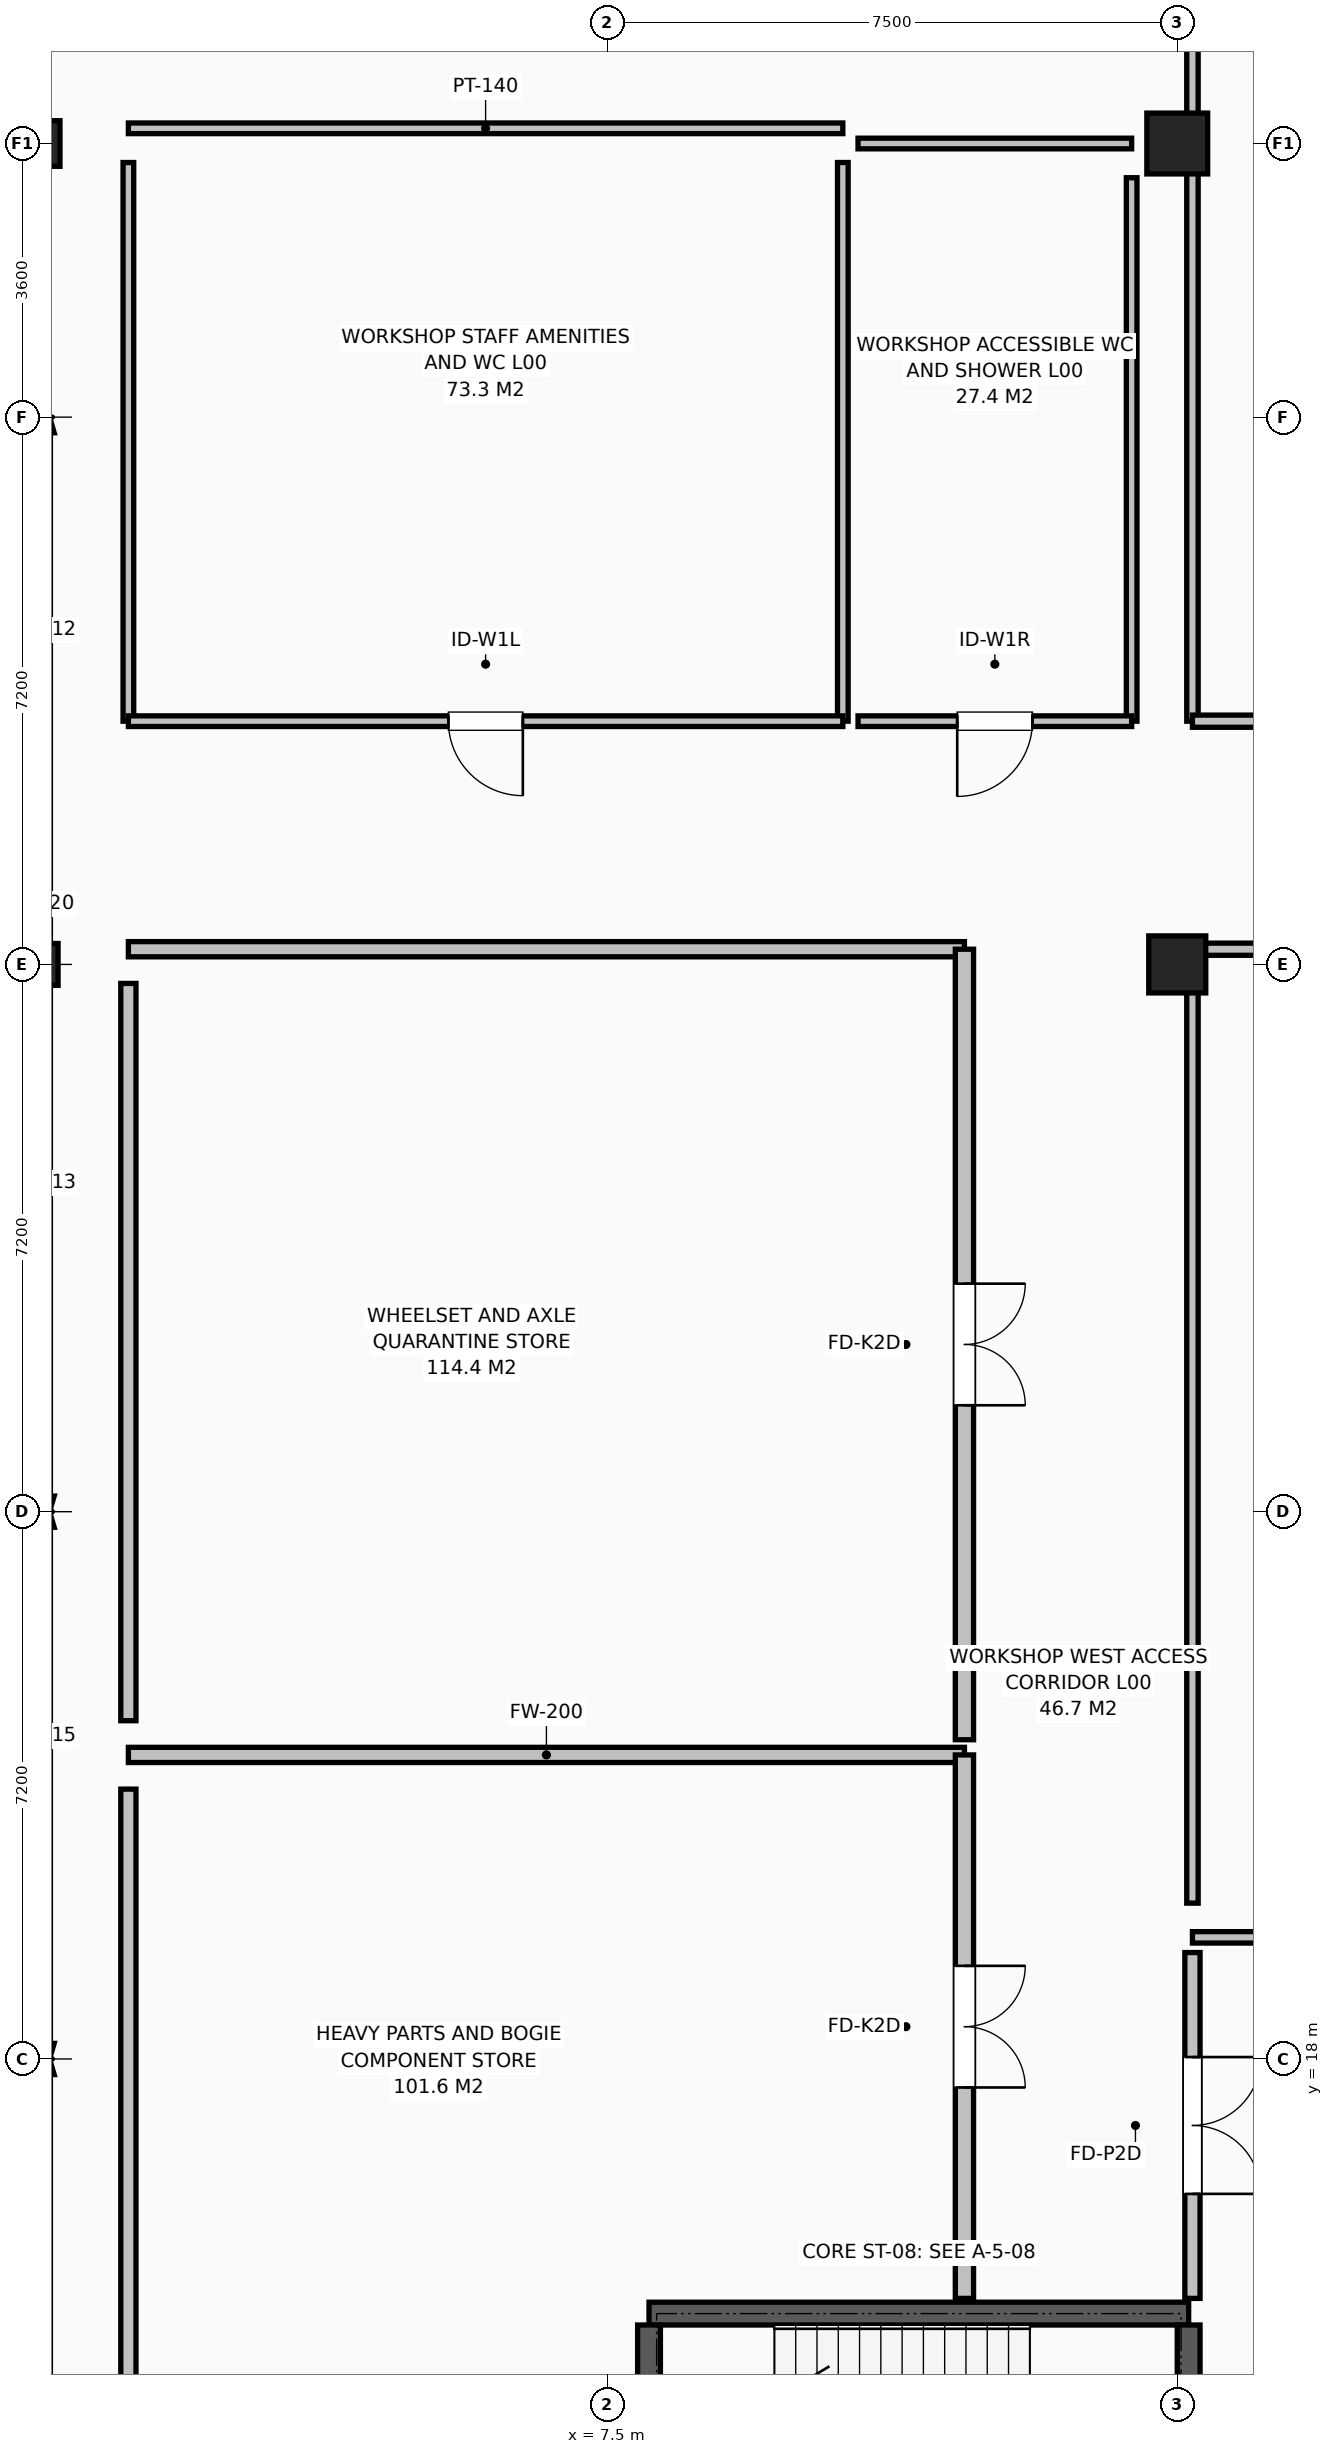
"""IFC4 building model, lengths in metres.
Left out: names, types, materials, properties, quantities, classifications, styles, units other than length and angle.
Written with IfcOpenShell. Run it as: python <this file> out.ifc"""

import sys

from ifc_helpers import new_model, si_unit, direction, frame, frame_2d, origin, origin_2d, place, context, subcontext, project, spatial, rectangle, extrude, element, fill, save


model = new_model("IFC4")
c1 = context("Model", 3, precision=1e-05, world=origin(), true_north=direction((0.0, 1.0)))
c2 = subcontext(c1, "Body", "Model", "MODEL_VIEW")
j1 = project(units=[si_unit("LENGTHUNIT", "METRE"), si_unit("PLANEANGLEUNIT", "RADIAN")], contexts=[c1])
p1 = place(None, origin())
s1 = spatial("IfcSite", under=j1, at=p1, CompositionType="ELEMENT")
p2 = place(p1, origin())
s2 = spatial("IfcBuilding", under=s1, at=p2, CompositionType="ELEMENT")
p3 = place(p2, origin())
s3 = spatial("IfcBuildingStorey", under=s2, at=p3, CompositionType="ELEMENT", Elevation=0.0)
p4 = place(p3, frame((0.0, 32.4, 0.0), z_axis=(0.0, 0.0, 1.0), x_axis=(1.0, 0.0, 0.0)))
e1 = element("IfcColumn", 1, at=p4, inside=s3, PredefinedType="COLUMN", context=c2, shape_type="SweptSolid", body=[
    extrude(rectangle(XDim=0.55, YDim=0.55, at=origin_2d()), origin(), (0.0, 0.0, 1.0), 4.8),
])
p5 = place(p3, frame((0.0, 43.2, 0.0), z_axis=(0.0, 0.0, 1.0), x_axis=(1.0, 0.0, 0.0)))
e2 = element("IfcColumn", 2, at=p5, inside=s3, PredefinedType="COLUMN", context=c2, shape_type="SweptSolid", body=[
    extrude(rectangle(XDim=0.6, YDim=0.6, at=origin_2d()), origin(), (0.0, 0.0, 1.0), 4.8),
])
p6 = place(p3, frame((15.0, 32.4, 0.0), z_axis=(0.0, 0.0, 1.0), x_axis=(1.0, 0.0, 0.0)))
e3 = element("IfcColumn", 3, at=p6, inside=s3, PredefinedType="COLUMN", context=c2, shape_type="SweptSolid", body=[
    extrude(rectangle(XDim=0.75, YDim=0.75, at=origin_2d()), origin(), (0.0, 0.0, 1.0), 4.8),
])
p7 = place(p3, frame((15.0, 43.2, 0.0), z_axis=(0.0, 0.0, 1.0), x_axis=(1.0, 0.0, 0.0)))
e4 = element("IfcColumn", 4, at=p7, inside=s3, PredefinedType="COLUMN", context=c2, shape_type="SweptSolid", body=[
    extrude(rectangle(XDim=0.8, YDim=0.8, at=origin_2d()), origin(), (0.0, 0.0, 1.0), 4.8),
])
p8 = place(p3, frame((15.15, 14.65, 0.0), z_axis=(0.0, 0.0, 1.0), x_axis=(-1.0, 0.0, 0.0)))
e5 = element("IfcWall", 5, at=p8, inside=s3, PredefinedType="SHEAR", context=c2, shape_type="SweptSolid", body=[
    extrude(rectangle(XDim=7.1, YDim=0.3, at=frame_2d((3.55, 0.0))), origin(), (0.0, 0.0, 1.0), 4.5),
])
p9 = place(p3, frame((15.15, 11.6, 0.0), z_axis=(0.0, 0.0, 1.0), x_axis=(0.0, 1.0, 0.0)))
e6 = element("IfcWall", 6, at=p9, inside=s3, PredefinedType="SHEAR", context=c2, shape_type="SweptSolid", body=[
    extrude(rectangle(XDim=2.9, YDim=0.3, at=frame_2d((1.45, 0.0))), origin(), (0.0, 0.0, 1.0), 4.5),
])
p10 = place(p3, frame((8.05, 14.5, 0.0), z_axis=(0.0, 0.0, 1.0), x_axis=(0.0, -1.0, 0.0)))
e7 = element("IfcWall", 7, at=p10, inside=s3, PredefinedType="SHEAR", context=c2, shape_type="SweptSolid", body=[
    extrude(rectangle(XDim=2.9, YDim=0.3, at=frame_2d((1.45, 0.0))), origin(), (0.0, 0.0, 1.0), 4.5),
])
p11 = place(p10, frame((0.75, 0.0, 0.0)))
e8 = element("IfcOpeningElement", 8, at=p11, cuts=e7, PredefinedType="OPENING", context=c2, shape_type="SweptSolid", body=[
    extrude(rectangle(XDim=1.07, YDim=2.15, at=frame_2d((0.535, 1.075))), frame((0.0, 0.16, 0.0), z_axis=(0.0, -1.0, 0.0), x_axis=(1.0, 0.0, 0.0)), (0.0, 0.0, 1.0), 0.32),
])
p12 = place(p3, frame((55.8, 19.6, 0.0), z_axis=(0.0, 0.0, 1.0), x_axis=(-1.0, 0.0, 0.0)))
e9 = element("IfcWall", 9, at=p12, inside=s3, PredefinedType="PARTITIONING", context=c2, shape_type="SweptSolid", body=[
    extrude(rectangle(XDim=40.6, YDim=0.15, at=frame_2d((20.3, 0.0))), origin(), (0.0, 0.0, 1.0), 3.682),
])
p13 = place(p3, frame((15.2, 32.6, 0.0), z_axis=(0.0, 0.0, 1.0), x_axis=(0.0, -1.0, 0.0)))
e10 = element("IfcWall", 10, at=p13, inside=s3, PredefinedType="PARTITIONING", context=c2, shape_type="SweptSolid", body=[
    extrude(rectangle(XDim=12.55, YDim=0.15, at=frame_2d((6.275, 0.0))), origin(), (0.0, 0.0, 1.0), 4.1),
])
p14 = place(p3, frame((15.2, 32.6, 0.0), z_axis=(0.0, 0.0, 1.0), x_axis=(1.0, 0.0, 0.0)))
e11 = element("IfcWall", 11, at=p14, inside=s3, PredefinedType="PARTITIONING", context=c2, shape_type="SweptSolid", body=[
    extrude(rectangle(XDim=40.6, YDim=0.16, at=frame_2d((20.3, 0.0))), origin(), (0.0, 0.0, 1.0), 3.87),
])
p15 = place(p14, frame((19.3, 0.0, 0.0)))
e12 = element("IfcOpeningElement", 12, at=p15, cuts=e11, PredefinedType="OPENING", context=c2, shape_type="SweptSolid", body=[
    extrude(rectangle(XDim=2.0, YDim=2.3, at=frame_2d((1.0, 1.15))), frame((0.0, 0.09, 0.0), z_axis=(0.0, -1.0, 0.0), x_axis=(1.0, 0.0, 0.0)), (0.0, 0.0, 1.0), 0.18),
])
p16 = place(p14, frame((35.4, 0.0, 0.0)))
e13 = element("IfcOpeningElement", 13, at=p16, cuts=e11, PredefinedType="OPENING", context=c2, shape_type="SweptSolid", body=[
    extrude(rectangle(XDim=2.0, YDim=2.3, at=frame_2d((1.0, 1.15))), frame((0.0, 0.09, 0.0), z_axis=(0.0, -1.0, 0.0), x_axis=(1.0, 0.0, 0.0)), (0.0, 0.0, 1.0), 0.18),
])
p17 = place(p3, frame((15.2, 52.75, 0.0), z_axis=(0.0, 0.0, 1.0), x_axis=(0.0, -1.0, 0.0)))
e14 = element("IfcWall", 14, at=p17, inside=s3, PredefinedType="PARTITIONING", context=c2, shape_type="SweptSolid", body=[
    extrude(rectangle(XDim=17.15, YDim=0.15, at=frame_2d((8.575, 0.0))), origin(), (0.0, 0.0, 1.0), 4.025),
])
p18 = place(p3, frame((47.8, 35.6, 0.0), z_axis=(0.0, 0.0, 1.0), x_axis=(-1.0, 0.0, 0.0)))
e15 = element("IfcWall", 15, at=p18, inside=s3, PredefinedType="PARTITIONING", context=c2, shape_type="SweptSolid", body=[
    extrude(rectangle(XDim=32.6, YDim=0.16, at=frame_2d((16.3, 0.0))), origin(), (0.0, 0.0, 1.0), 4.025),
])
p19 = place(p18, frame((15.3, 0.0, 0.0)))
e16 = element("IfcOpeningElement", 16, at=p19, cuts=e15, PredefinedType="OPENING", context=c2, shape_type="SweptSolid", body=[
    extrude(rectangle(XDim=2.0, YDim=2.3, at=frame_2d((1.0, 1.15))), frame((0.0, 0.09, 0.0), z_axis=(0.0, -1.0, 0.0), x_axis=(1.0, 0.0, 0.0)), (0.0, 0.0, 1.0), 0.18),
])
p20 = place(p18, frame((27.4, 0.0, 0.0)))
e17 = element("IfcOpeningElement", 17, at=p20, cuts=e15, PredefinedType="OPENING", context=c2, shape_type="SweptSolid", body=[
    extrude(rectangle(XDim=2.0, YDim=2.3, at=frame_2d((1.0, 1.15))), frame((0.0, 0.09, 0.0), z_axis=(0.0, -1.0, 0.0), x_axis=(1.0, 0.0, 0.0)), (0.0, 0.0, 1.0), 0.18),
])
p21 = place(p3, frame((1.2, 22.0, 0.0), z_axis=(0.0, 0.0, 1.0), x_axis=(1.0, 0.0, 0.0)))
e18 = element("IfcWall", 18, at=p21, inside=s3, PredefinedType="SOLIDWALL", context=c2, shape_type="SweptSolid", body=[
    extrude(rectangle(XDim=11.0, YDim=0.2, at=frame_2d((5.5, 0.0))), origin(), (0.0, 0.0, 1.0), 4.1),
])
p22 = place(p3, frame((1.2, 21.55, 0.0), z_axis=(0.0, 0.0, 1.0), x_axis=(0.0, -1.0, 0.0)))
e19 = element("IfcWall", 19, at=p22, inside=s3, PredefinedType="SOLIDWALL", context=c2, shape_type="SweptSolid", body=[
    extrude(rectangle(XDim=9.7, YDim=0.2, at=frame_2d((4.85, 0.0))), origin(), (0.0, 0.0, 1.0), 4.1),
])
p23 = place(p3, frame((12.2, 14.85, 0.0), z_axis=(0.0, 0.0, 1.0), x_axis=(0.0, 1.0, 0.0)))
e20 = element("IfcWall", 20, at=p23, inside=s3, PredefinedType="SOLIDWALL", context=c2, shape_type="SweptSolid", body=[
    extrude(rectangle(XDim=7.15, YDim=0.24, at=frame_2d((3.575, 0.0))), origin(), (0.0, 0.0, 1.0), 4.1),
])
p24 = place(p23, frame((2.775, 0.0, 0.0)))
e21 = element("IfcOpeningElement", 21, at=p24, cuts=e20, PredefinedType="OPENING", context=c2, shape_type="SweptSolid", body=[
    extrude(rectangle(XDim=1.6, YDim=2.15, at=frame_2d((0.8, 1.075))), frame((0.0, 0.13, 0.0), z_axis=(0.0, -1.0, 0.0), x_axis=(1.0, 0.0, 0.0)), (0.0, 0.0, 1.0), 0.26),
])
p25 = place(p3, frame((1.2, 32.6, 0.0), z_axis=(0.0, 0.0, 1.0), x_axis=(1.0, 0.0, 0.0)))
e22 = element("IfcWall", 22, at=p25, inside=s3, PredefinedType="SOLIDWALL", context=c2, shape_type="SweptSolid", body=[
    extrude(rectangle(XDim=11.0, YDim=0.2, at=frame_2d((5.5, 0.0))), origin(), (0.0, 0.0, 1.0), 3.87),
])
p26 = place(p3, frame((1.2, 32.15, 0.0), z_axis=(0.0, 0.0, 1.0), x_axis=(0.0, -1.0, 0.0)))
e23 = element("IfcWall", 23, at=p26, inside=s3, PredefinedType="SOLIDWALL", context=c2, shape_type="SweptSolid", body=[
    extrude(rectangle(XDim=9.7, YDim=0.2, at=frame_2d((4.85, 0.0))), origin(), (0.0, 0.0, 1.0), 4.1),
])
p27 = place(p3, frame((12.2, 22.2, 0.0), z_axis=(0.0, 0.0, 1.0), x_axis=(0.0, 1.0, 0.0)))
e24 = element("IfcWall", 24, at=p27, inside=s3, PredefinedType="SOLIDWALL", context=c2, shape_type="SweptSolid", body=[
    extrude(rectangle(XDim=10.4, YDim=0.24, at=frame_2d((5.2, 0.0))), origin(), (0.0, 0.0, 1.0), 3.87),
])
p28 = place(p27, frame((4.4, 0.0, 0.0)))
e25 = element("IfcOpeningElement", 25, at=p28, cuts=e24, PredefinedType="OPENING", context=c2, shape_type="SweptSolid", body=[
    extrude(rectangle(XDim=1.6, YDim=2.15, at=frame_2d((0.8, 1.075))), frame((0.0, 0.13, 0.0), z_axis=(0.0, -1.0, 0.0), x_axis=(1.0, 0.0, 0.0)), (0.0, 0.0, 1.0), 0.26),
])
p29 = place(p3, frame((15.2, 19.4, 0.0), z_axis=(0.0, 0.0, 1.0), x_axis=(0.0, -1.0, 0.0)))
e26 = element("IfcWall", 26, at=p29, inside=s3, PredefinedType="SOLIDWALL", context=c2, shape_type="SweptSolid", body=[
    extrude(rectangle(XDim=4.55, YDim=0.2, at=frame_2d((2.275, 0.0))), origin(), (0.0, 0.0, 1.0), 4.1),
])
p30 = place(p29, frame((1.375, 0.0, 0.0)))
e27 = element("IfcOpeningElement", 27, at=p30, cuts=e26, PredefinedType="OPENING", context=c2, shape_type="SweptSolid", body=[
    extrude(rectangle(XDim=1.8, YDim=2.2, at=frame_2d((0.9, 1.1))), frame((0.0, 0.11, 0.0), z_axis=(0.0, -1.0, 0.0), x_axis=(1.0, 0.0, 0.0)), (0.0, 0.0, 1.0), 0.22),
])
p31 = place(p3, frame((1.2, 43.4, 0.0), z_axis=(0.0, 0.0, 1.0), x_axis=(1.0, 0.0, 0.0)))
e28 = element("IfcWall", 28, at=p31, inside=s3, PredefinedType="PARTITIONING", context=c2, shape_type="SweptSolid", body=[
    extrude(rectangle(XDim=9.4, YDim=0.14, at=frame_2d((4.7, 0.0))), origin(), (0.0, 0.0, 1.0), 3.8),
])
for number, where, z_axis, x_axis in (
    (29, (10.6, 35.6, 0.0), (0.0, 0.0, 1.0), (0.0, 1.0, 0.0)),
    (30, (1.2, 42.95, 0.0), (0.0, 0.0, 1.0), (0.0, -1.0, 0.0)),
):
    element("IfcWall", number, at=place(p3, frame(where, z_axis=z_axis, x_axis=x_axis)), inside=s3, PredefinedType="PARTITIONING", context=c2, shape_type="SweptSolid", body=[
        extrude(rectangle(XDim=7.35, YDim=0.14, at=frame_2d((3.675, 0.0))), origin(), (0.0, 0.0, 1.0), 3.8),
    ])
p32 = place(p3, frame((10.6, 35.6, 0.0), z_axis=(0.0, 0.0, 1.0), x_axis=(-1.0, 0.0, 0.0)))
e31 = element("IfcWall", 31, at=p32, inside=s3, PredefinedType="PARTITIONING", context=c2, shape_type="SweptSolid", body=[
    extrude(rectangle(XDim=9.4, YDim=0.14, at=frame_2d((4.7, 0.0))), origin(), (0.0, 0.0, 1.0), 3.8),
])
p33 = place(p32, frame((4.21, 0.0, 0.0)))
e32 = element("IfcOpeningElement", 32, at=p33, cuts=e31, PredefinedType="OPENING", context=c2, shape_type="SweptSolid", body=[
    extrude(rectangle(XDim=0.98, YDim=2.15, at=frame_2d((0.49, 1.075))), frame((0.0, 0.08, 0.0), z_axis=(0.0, -1.0, 0.0), x_axis=(1.0, 0.0, 0.0)), (0.0, 0.0, 1.0), 0.16),
])
p34 = place(p3, frame((10.8, 43.2, 0.0), z_axis=(0.0, 0.0, 1.0), x_axis=(1.0, 0.0, 0.0)))
e33 = element("IfcWall", 33, at=p34, inside=s3, PredefinedType="PARTITIONING", context=c2, shape_type="SweptSolid", body=[
    extrude(rectangle(XDim=3.6, YDim=0.14, at=frame_2d((1.8, 0.0))), origin(), (0.0, 0.0, 1.0), 3.8),
])
p35 = place(p3, frame((14.4, 35.6, 0.0), z_axis=(0.0, 0.0, 1.0), x_axis=(0.0, 1.0, 0.0)))
e34 = element("IfcWall", 34, at=p35, inside=s3, PredefinedType="PARTITIONING", context=c2, shape_type="SweptSolid", body=[
    extrude(rectangle(XDim=7.15, YDim=0.14, at=frame_2d((3.575, 0.0))), origin(), (0.0, 0.0, 1.0), 3.8),
])
p36 = place(p3, frame((14.4, 35.6, 0.0), z_axis=(0.0, 0.0, 1.0), x_axis=(-1.0, 0.0, 0.0)))
e35 = element("IfcWall", 35, at=p36, inside=s3, PredefinedType="PARTITIONING", context=c2, shape_type="SweptSolid", body=[
    extrude(rectangle(XDim=3.6, YDim=0.14, at=frame_2d((1.8, 0.0))), origin(), (0.0, 0.0, 1.0), 3.8),
])
p37 = place(p36, frame((1.305, 0.0, 0.0)))
e36 = element("IfcOpeningElement", 36, at=p37, cuts=e35, PredefinedType="OPENING", context=c2, shape_type="SweptSolid", body=[
    extrude(rectangle(XDim=0.99, YDim=2.15, at=frame_2d((0.495, 1.075))), frame((0.0, 0.08, 0.0), z_axis=(0.0, -1.0, 0.0), x_axis=(1.0, 0.0, 0.0)), (0.0, 0.0, 1.0), 0.16),
])
p38 = place(p24, origin())
e37 = element("IfcDoor", 37, at=p38, inside=s3, OperationType="DOUBLE_SWING_RIGHT", PredefinedType="DOOR", context=c2, shape_type="SweptSolid", body=[
    extrude(rectangle(XDim=1.6, YDim=2.15, at=frame_2d((0.8, 1.075))), frame((0.0, 0.025, 0.0), z_axis=(0.0, -1.0, 0.0), x_axis=(1.0, 0.0, 0.0)), (0.0, 0.0, 1.0), 0.05),
])
fill(e21, e37)
p39 = place(p28, origin())
e38 = element("IfcDoor", 38, at=p39, inside=s3, OperationType="DOUBLE_SWING_RIGHT", PredefinedType="DOOR", context=c2, shape_type="SweptSolid", body=[
    extrude(rectangle(XDim=1.6, YDim=2.15, at=frame_2d((0.8, 1.075))), frame((0.0, 0.025, 0.0), z_axis=(0.0, -1.0, 0.0), x_axis=(1.0, 0.0, 0.0)), (0.0, 0.0, 1.0), 0.05),
])
fill(e25, e38)
p40 = place(p30, origin())
e39 = element("IfcDoor", 39, at=p40, inside=s3, OperationType="DOUBLE_SWING_LEFT", PredefinedType="DOOR", context=c2, shape_type="SweptSolid", body=[
    extrude(rectangle(XDim=1.8, YDim=2.2, at=frame_2d((0.9, 1.1))), frame((0.0, 0.025, 0.0), z_axis=(0.0, -1.0, 0.0), x_axis=(1.0, 0.0, 0.0)), (0.0, 0.0, 1.0), 0.05),
])
fill(e27, e39)
p41 = place(p33, origin())
e40 = element("IfcDoor", 40, at=p41, inside=s3, OperationType="SINGLE_SWING_LEFT", PredefinedType="DOOR", context=c2, shape_type="SweptSolid", body=[
    extrude(rectangle(XDim=0.98, YDim=2.15, at=frame_2d((0.49, 1.075))), frame((0.0, 0.025, 0.0), z_axis=(0.0, -1.0, 0.0), x_axis=(1.0, 0.0, 0.0)), (0.0, 0.0, 1.0), 0.05),
])
fill(e32, e40)
p42 = place(p37, origin())
e41 = element("IfcDoor", 41, at=p42, inside=s3, OperationType="SINGLE_SWING_RIGHT", PredefinedType="DOOR", context=c2, shape_type="SweptSolid", body=[
    extrude(rectangle(XDim=0.99, YDim=2.15, at=frame_2d((0.495, 1.075))), frame((0.0, 0.025, 0.0), z_axis=(0.0, -1.0, 0.0), x_axis=(1.0, 0.0, 0.0)), (0.0, 0.0, 1.0), 0.05),
])
fill(e36, e41)
save(model, sys.argv[1])
